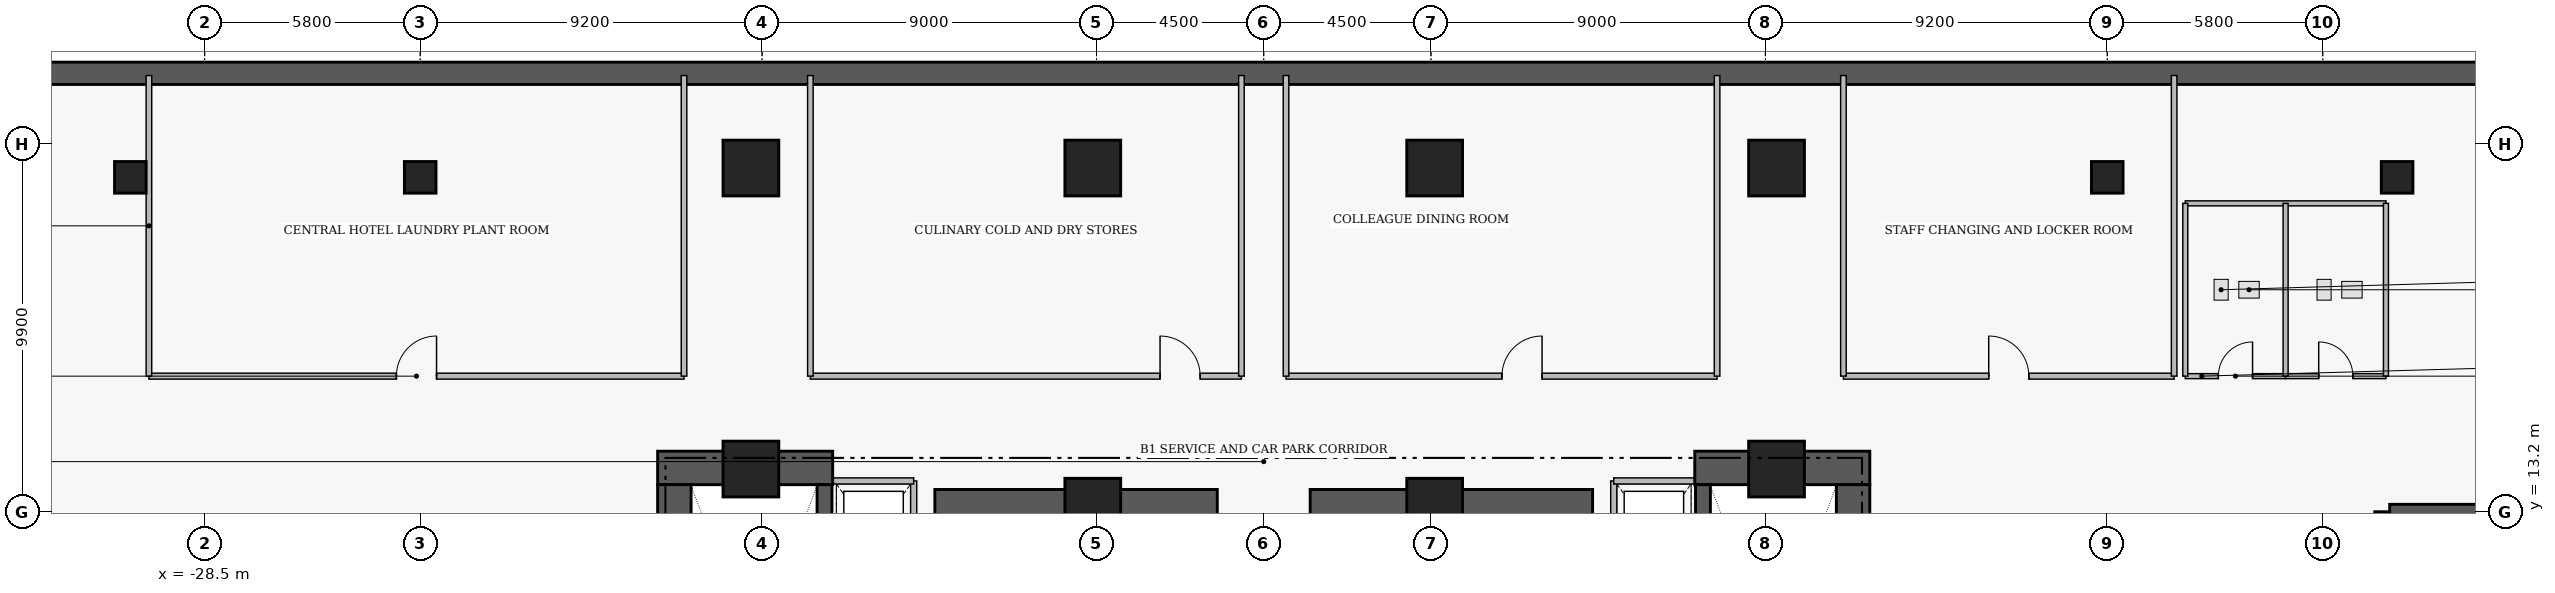
"""IFC4 building model, lengths in metres.
Left out: names, types, materials, properties, quantities, classifications, styles, units other than length and angle.
Written with IfcOpenShell. Run it as: python <this file> out.ifc"""

import sys

from ifc_helpers import new_model, si_unit, direction, frame, frame_2d, origin, origin_2d, place, context, subcontext, project, spatial, rectangle, extrude, element, fill, save


model = new_model("IFC4")
c1 = context("Model", 3, precision=1e-05, world=origin(), true_north=direction((0.0, 1.0)))
c2 = subcontext(c1, "Body", "Model", "MODEL_VIEW")
j1 = project(units=[si_unit("LENGTHUNIT", "METRE"), si_unit("PLANEANGLEUNIT", "RADIAN")], contexts=[c1])
p1 = place(None, origin())
s1 = spatial("IfcSite", under=j1, at=p1, CompositionType="ELEMENT")
p2 = place(p1, origin())
s2 = spatial("IfcBuilding", under=s1, at=p2, CompositionType="ELEMENT")
p3 = place(p2, frame((0.0, 0.0, -4.5)))
s3 = spatial("IfcBuildingStorey", under=s2, at=p3, CompositionType="ELEMENT", Elevation=-4.5)
p4 = place(p3, frame((-36.3, 25.0, 0.0), z_axis=(0.0, 0.0, 1.0), x_axis=(1.0, 0.0, 0.0)))
e1 = element("IfcWall", 1, at=p4, inside=s3, PredefinedType="USERDEFINED", context=c2, shape_type="SweptSolid", body=[
    extrude(rectangle(XDim=72.6, YDim=0.6, at=frame_2d((36.3, 0.0))), origin(), (0.0, 0.0, 1.0), 4.24),
])
for number, where, z_axis, x_axis in (
    (2, (-16.31, 14.38, 0.0), (0.0, 0.0, 1.0), (1.0, 0.0, 0.0)),
    (3, (11.6, 14.38, 0.0), (0.0, 0.0, 1.0), (1.0, 0.0, 0.0)),
):
    element("IfcWall", number, at=place(p3, frame(where, z_axis=z_axis, x_axis=x_axis)), inside=s3, PredefinedType="SHEAR", context=c2, shape_type="SweptSolid", body=[
        extrude(rectangle(XDim=4.71, YDim=0.9, at=frame_2d((2.355, 0.0))), origin(), (0.0, 0.0, 1.0), 4.31),
    ])
for number, where, z_axis, x_axis in (
    (4, (-15.86, 4.97, 0.0), (0.0, 0.0, 1.0), (0.0, 1.0, 0.0)),
    (5, (15.86, 4.97, 0.0), (0.0, 0.0, 1.0), (0.0, 1.0, 0.0)),
):
    element("IfcWall", number, at=place(p3, frame(where, z_axis=z_axis, x_axis=x_axis)), inside=s3, PredefinedType="SHEAR", context=c2, shape_type="SweptSolid", body=[
        extrude(rectangle(XDim=8.96, YDim=0.9, at=frame_2d((4.48, 0.0))), origin(), (0.0, 0.0, 1.0), 4.31),
    ])
for number, where, z_axis, x_axis in (
    (6, (-8.85, 13.35, 0.0), (0.0, 0.0, 1.0), (1.0, 0.0, 0.0)),
    (7, (1.25, 13.35, 0.0), (0.0, 0.0, 1.0), (1.0, 0.0, 0.0)),
):
    element("IfcWall", number, at=place(p3, frame(where, z_axis=z_axis, x_axis=x_axis)), inside=s3, PredefinedType="SHEAR", context=c2, shape_type="SweptSolid", body=[
        extrude(rectangle(XDim=7.6, YDim=0.9, at=frame_2d((3.8, 0.0))), origin(), (0.0, 0.0, 1.0), 4.24),
    ])
p5 = place(p3, frame((-11.82, 4.97, 0.0), z_axis=(0.0, 0.0, 1.0), x_axis=(0.0, 1.0, 0.0)))
e8 = element("IfcWall", 8, at=p5, inside=s3, PredefinedType="SHEAR", context=c2, shape_type="SweptSolid", body=[
    extrude(rectangle(XDim=8.96, YDim=0.4, at=frame_2d((4.48, 0.0))), origin(), (0.0, 0.0, 1.0), 4.31),
])
p6 = place(p5, frame((0.31, 0.0, 0.0)))
e9 = element("IfcOpeningElement", 9, at=p6, cuts=e8, PredefinedType="OPENING", context=c2, shape_type="SweptSolid", body=[
    extrude(rectangle(XDim=1.12, YDim=2.22, at=frame_2d((0.56, 1.11))), frame((0.0, 0.21, 0.0), z_axis=(0.0, -1.0, 0.0), x_axis=(1.0, 0.0, 0.0)), (0.0, 0.0, 1.0), 0.42),
])
p7 = place(p3, frame((11.82, 13.93, 0.0), z_axis=(0.0, 0.0, 1.0), x_axis=(0.0, -1.0, 0.0)))
e10 = element("IfcWall", 10, at=p7, inside=s3, PredefinedType="SHEAR", context=c2, shape_type="SweptSolid", body=[
    extrude(rectangle(XDim=8.96, YDim=0.4, at=frame_2d((4.48, 0.0))), origin(), (0.0, 0.0, 1.0), 4.31),
])
p8 = place(p7, frame((7.53, 0.0, 0.0)))
e11 = element("IfcOpeningElement", 11, at=p8, cuts=e10, PredefinedType="OPENING", context=c2, shape_type="SweptSolid", body=[
    extrude(rectangle(XDim=1.12, YDim=2.22, at=frame_2d((0.56, 1.11))), frame((0.0, 0.21, 0.0), z_axis=(0.0, -1.0, 0.0), x_axis=(1.0, 0.0, 0.0)), (0.0, 0.0, 1.0), 0.42),
])
p9 = place(p3, frame((30.1, 13.2, 0.0), z_axis=(0.0, 0.0, 1.0), x_axis=(0.0, -1.0, 0.0)))
e12 = element("IfcWall", 12, at=p9, inside=s3, PredefinedType="SHEAR", context=c2, shape_type="SweptSolid", body=[
    extrude(rectangle(XDim=11.8, YDim=0.4, at=frame_2d((5.9, 0.0))), origin(), (0.0, 0.0, 1.0), 4.31),
])
p10 = place(p9, frame((9.7, 0.0, 0.0)))
e13 = element("IfcOpeningElement", 13, at=p10, cuts=e12, PredefinedType="OPENING", context=c2, shape_type="SweptSolid", body=[
    extrude(rectangle(XDim=1.12, YDim=2.22, at=frame_2d((0.56, 1.11))), frame((0.0, 0.21, 0.0), z_axis=(0.0, -1.0, 0.0), x_axis=(1.0, 0.0, 0.0)), (0.0, 0.0, 1.0), 0.42),
])
p11 = place(p3, frame((30.3, 13.2, 0.0), z_axis=(0.0, 0.0, 1.0), x_axis=(1.0, 0.0, 0.0)))
e14 = element("IfcWall", 14, at=p11, inside=s3, PredefinedType="SHEAR", context=c2, shape_type="SweptSolid", body=[
    extrude(rectangle(XDim=5.4, YDim=0.4, at=frame_2d((2.7, 0.0))), origin(), (0.0, 0.0, 1.0), 4.31),
])
for number, where, z_axis, x_axis in (
    (15, (-13.8, 14.35, 0.0), (0.0, 0.0, 1.0), (1.0, 0.0, 0.0)),
    (16, (-4.6, 13.35, 0.0), (0.0, 0.0, 1.0), (1.0, 0.0, 0.0)),
    (17, (4.6, 13.35, 0.0), (0.0, 0.0, 1.0), (1.0, 0.0, 0.0)),
    (18, (13.8, 14.35, 0.0), (0.0, 0.0, 1.0), (1.0, 0.0, 0.0)),
    (19, (-13.8, 22.45, 0.0), (0.0, 0.0, 1.0), (1.0, 0.0, 0.0)),
    (20, (-4.6, 22.45, 0.0), (0.0, 0.0, 1.0), (1.0, 0.0, 0.0)),
    (21, (4.6, 22.45, 0.0), (0.0, 0.0, 1.0), (1.0, 0.0, 0.0)),
    (22, (13.8, 22.45, 0.0), (0.0, 0.0, 1.0), (1.0, 0.0, 0.0)),
):
    element("IfcColumn", number, at=place(p3, frame(where, z_axis=z_axis, x_axis=x_axis)), inside=s3, PredefinedType="COLUMN", context=c2, shape_type="SweptSolid", body=[
        extrude(rectangle(XDim=1.5, YDim=1.5, at=origin_2d()), origin(), (0.0, 0.0, 1.0), 4.5),
    ])
for number, where, z_axis, x_axis in (
    (23, (-30.5, 22.2, 0.0), (0.0, 0.0, 1.0), (1.0, 0.0, 0.0)),
    (24, (30.5, 22.2, 0.0), (0.0, 0.0, 1.0), (1.0, 0.0, 0.0)),
    (25, (-22.7, 22.2, 0.0), (0.0, 0.0, 1.0), (1.0, 0.0, 0.0)),
    (26, (22.7, 22.2, 0.0), (0.0, 0.0, 1.0), (1.0, 0.0, 0.0)),
):
    element("IfcColumn", number, at=place(p3, frame(where, z_axis=z_axis, x_axis=x_axis)), inside=s3, PredefinedType="COLUMN", context=c2, shape_type="SweptSolid", body=[
        extrude(rectangle(XDim=0.85, YDim=0.85, at=origin_2d()), origin(), (0.0, 0.0, 1.0), 4.5),
    ])
p12 = place(p3, frame((-30.0, 16.85, 0.0), z_axis=(0.0, 0.0, 1.0), x_axis=(1.0, 0.0, 0.0)))
e27 = element("IfcWall", 27, at=p12, inside=s3, PredefinedType="PARTITIONING", context=c2, shape_type="SweptSolid", body=[
    extrude(rectangle(XDim=14.4, YDim=0.16, at=frame_2d((7.2, 0.0))), origin(), (0.0, 0.0, 1.0), 4.24),
])
p13 = place(p12, frame((6.66, 0.0, 0.0)))
e28 = element("IfcOpeningElement", 28, at=p13, cuts=e27, PredefinedType="OPENING", context=c2, shape_type="SweptSolid", body=[
    extrude(rectangle(XDim=1.08, YDim=2.18, at=frame_2d((0.54, 1.09))), frame((0.0, 0.09, 0.0), z_axis=(0.0, -1.0, 0.0), x_axis=(1.0, 0.0, 0.0)), (0.0, 0.0, 1.0), 0.18),
])
p14 = place(p3, frame((-12.2, 16.85, 0.0), z_axis=(0.0, 0.0, 1.0), x_axis=(1.0, 0.0, 0.0)))
e29 = element("IfcWall", 29, at=p14, inside=s3, PredefinedType="PARTITIONING", context=c2, shape_type="SweptSolid", body=[
    extrude(rectangle(XDim=11.6, YDim=0.16, at=frame_2d((5.8, 0.0))), origin(), (0.0, 0.0, 1.0), 3.707),
])
p15 = place(p14, frame((9.41, 0.0, 0.0)))
e30 = element("IfcOpeningElement", 30, at=p15, cuts=e29, PredefinedType="OPENING", context=c2, shape_type="SweptSolid", body=[
    extrude(rectangle(XDim=1.08, YDim=2.18, at=frame_2d((0.54, 1.09))), frame((0.0, 0.09, 0.0), z_axis=(0.0, -1.0, 0.0), x_axis=(1.0, 0.0, 0.0)), (0.0, 0.0, 1.0), 0.18),
])
p16 = place(p3, frame((0.6, 16.85, 0.0), z_axis=(0.0, 0.0, 1.0), x_axis=(1.0, 0.0, 0.0)))
e31 = element("IfcWall", 31, at=p16, inside=s3, PredefinedType="PARTITIONING", context=c2, shape_type="SweptSolid", body=[
    extrude(rectangle(XDim=11.6, YDim=0.16, at=frame_2d((5.8, 0.0))), origin(), (0.0, 0.0, 1.0), 3.707),
])
p17 = place(p16, frame((5.81, 0.0, 0.0)))
e32 = element("IfcOpeningElement", 32, at=p17, cuts=e31, PredefinedType="OPENING", context=c2, shape_type="SweptSolid", body=[
    extrude(rectangle(XDim=1.08, YDim=2.18, at=frame_2d((0.54, 1.09))), frame((0.0, 0.09, 0.0), z_axis=(0.0, -1.0, 0.0), x_axis=(1.0, 0.0, 0.0)), (0.0, 0.0, 1.0), 0.18),
])
p18 = place(p3, frame((15.6, 16.85, 0.0), z_axis=(0.0, 0.0, 1.0), x_axis=(1.0, 0.0, 0.0)))
e33 = element("IfcWall", 33, at=p18, inside=s3, PredefinedType="PARTITIONING", context=c2, shape_type="SweptSolid", body=[
    extrude(rectangle(XDim=8.9, YDim=0.16, at=frame_2d((4.45, 0.0))), origin(), (0.0, 0.0, 1.0), 4.24),
])
p19 = place(p18, frame((3.91, 0.0, 0.0)))
e34 = element("IfcOpeningElement", 34, at=p19, cuts=e33, PredefinedType="OPENING", context=c2, shape_type="SweptSolid", body=[
    extrude(rectangle(XDim=1.08, YDim=2.18, at=frame_2d((0.54, 1.09))), frame((0.0, 0.09, 0.0), z_axis=(0.0, -1.0, 0.0), x_axis=(1.0, 0.0, 0.0)), (0.0, 0.0, 1.0), 0.18),
])
p20 = place(p3, frame((24.8, 16.85, 0.0), z_axis=(0.0, 0.0, 1.0), x_axis=(1.0, 0.0, 0.0)))
e35 = element("IfcWall", 35, at=p20, inside=s3, PredefinedType="PLUMBINGWALL", context=c2, shape_type="SweptSolid", body=[
    extrude(rectangle(XDim=2.7, YDim=0.135, at=frame_2d((1.35, 0.0))), origin(), (0.0, 0.0, 1.0), 4.24),
])
p21 = place(p20, frame((0.89, 0.0, 0.0)))
e36 = element("IfcOpeningElement", 36, at=p21, cuts=e35, PredefinedType="OPENING", context=c2, shape_type="SweptSolid", body=[
    extrude(rectangle(XDim=0.92, YDim=2.12, at=frame_2d((0.46, 1.06))), frame((0.0, 0.077, 0.0), z_axis=(0.0, -1.0, 0.0), x_axis=(1.0, 0.0, 0.0)), (0.0, 0.0, 1.0), 0.155),
])
p22 = place(p3, frame((27.5, 16.85, 0.0), z_axis=(0.0, 0.0, 1.0), x_axis=(1.0, 0.0, 0.0)))
e37 = element("IfcWall", 37, at=p22, inside=s3, PredefinedType="PLUMBINGWALL", context=c2, shape_type="SweptSolid", body=[
    extrude(rectangle(XDim=2.7, YDim=0.135, at=frame_2d((1.35, 0.0))), origin(), (0.0, 0.0, 1.0), 4.24),
])
p23 = place(p22, frame((0.89, 0.0, 0.0)))
e38 = element("IfcOpeningElement", 38, at=p23, cuts=e37, PredefinedType="OPENING", context=c2, shape_type="SweptSolid", body=[
    extrude(rectangle(XDim=0.92, YDim=2.12, at=frame_2d((0.46, 1.06))), frame((0.0, 0.077, 0.0), z_axis=(0.0, -1.0, 0.0), x_axis=(1.0, 0.0, 0.0)), (0.0, 0.0, 1.0), 0.155),
])
p24 = place(p3, frame((-9.42, 11.07, 0.0), z_axis=(0.0, 0.0, 1.0), x_axis=(0.0, 1.0, 0.0)))
e39 = element("IfcWall", 39, at=p24, inside=s3, PredefinedType="PARTITIONING", context=c2, shape_type="SweptSolid", body=[
    extrude(rectangle(XDim=2.96, YDim=0.165, at=frame_2d((1.48, 0.0))), origin(), (0.0, 0.0, 1.0), 4.24),
])
p25 = place(p3, frame((-11.58, 14.03, 0.0), z_axis=(0.0, 0.0, 1.0), x_axis=(1.0, 0.0, 0.0)))
e40 = element("IfcWall", 40, at=p25, inside=s3, PredefinedType="PARTITIONING", context=c2, shape_type="SweptSolid", body=[
    extrude(rectangle(XDim=2.16, YDim=0.165, at=frame_2d((1.08, 0.0))), origin(), (0.0, 0.0, 1.0), 4.24),
])
p26 = place(p3, frame((9.42, 11.07, 0.0), z_axis=(0.0, 0.0, 1.0), x_axis=(0.0, 1.0, 0.0)))
e41 = element("IfcWall", 41, at=p26, inside=s3, PredefinedType="PARTITIONING", context=c2, shape_type="SweptSolid", body=[
    extrude(rectangle(XDim=2.96, YDim=0.165, at=frame_2d((1.48, 0.0))), origin(), (0.0, 0.0, 1.0), 4.24),
])
p27 = place(p3, frame((9.42, 14.03, 0.0), z_axis=(0.0, 0.0, 1.0), x_axis=(1.0, 0.0, 0.0)))
e42 = element("IfcWall", 42, at=p27, inside=s3, PredefinedType="PARTITIONING", context=c2, shape_type="SweptSolid", body=[
    extrude(rectangle(XDim=2.16, YDim=0.165, at=frame_2d((1.08, 0.0))), origin(), (0.0, 0.0, 1.0), 4.24),
])
for number, where, z_axis, x_axis in (
    (43, (-30.0, 16.85, 0.0), (0.0, 0.0, 1.0), (0.0, 1.0, 0.0)),
    (44, (-15.6, 16.85, 0.0), (0.0, 0.0, 1.0), (0.0, 1.0, 0.0)),
    (45, (-12.2, 16.85, 0.0), (0.0, 0.0, 1.0), (0.0, 1.0, 0.0)),
    (46, (-0.6, 16.85, 0.0), (0.0, 0.0, 1.0), (0.0, 1.0, 0.0)),
    (47, (0.6, 16.85, 0.0), (0.0, 0.0, 1.0), (0.0, 1.0, 0.0)),
    (48, (12.2, 16.85, 0.0), (0.0, 0.0, 1.0), (0.0, 1.0, 0.0)),
    (49, (15.6, 16.85, 0.0), (0.0, 0.0, 1.0), (0.0, 1.0, 0.0)),
    (50, (24.5, 16.85, 0.0), (0.0, 0.0, 1.0), (0.0, 1.0, 0.0)),
):
    element("IfcWall", number, at=place(p3, frame(where, z_axis=z_axis, x_axis=x_axis)), inside=s3, PredefinedType="PARTITIONING", context=c2, shape_type="SweptSolid", body=[
        extrude(rectangle(XDim=8.09, YDim=0.15, at=frame_2d((4.045, 0.0))), origin(), (0.0, 0.0, 1.0), 4.24),
    ])
p28 = place(p3, frame((24.8, 21.5, 0.0), z_axis=(0.0, 0.0, 1.0), x_axis=(1.0, 0.0, 0.0)))
e51 = element("IfcWall", 51, at=p28, inside=s3, PredefinedType="PLUMBINGWALL", context=c2, shape_type="SweptSolid", body=[
    extrude(rectangle(XDim=5.4, YDim=0.135, at=frame_2d((2.7, 0.0))), origin(), (0.0, 0.0, 1.0), 4.24),
])
for number, where, z_axis, x_axis in (
    (52, (24.8, 16.85, 0.0), (0.0, 0.0, 1.0), (0.0, 1.0, 0.0)),
    (53, (30.2, 16.85, 0.0), (0.0, 0.0, 1.0), (0.0, 1.0, 0.0)),
    (54, (27.5, 16.85, 0.0), (0.0, 0.0, 1.0), (0.0, 1.0, 0.0)),
):
    element("IfcWall", number, at=place(p3, frame(where, z_axis=z_axis, x_axis=x_axis)), inside=s3, PredefinedType="PLUMBINGWALL", context=c2, shape_type="SweptSolid", body=[
        extrude(rectangle(XDim=4.65, YDim=0.135, at=frame_2d((2.325, 0.0))), origin(), (0.0, 0.0, 1.0), 4.24),
    ])
p29 = place(p13, origin())
e55 = element("IfcDoor", 55, at=p29, inside=s3, OperationType="SINGLE_SWING_RIGHT", PredefinedType="DOOR", context=c2, shape_type="SweptSolid", body=[
    extrude(rectangle(XDim=1.08, YDim=2.18, at=frame_2d((0.54, 1.09))), frame((0.0, 0.025, 0.0), z_axis=(0.0, -1.0, 0.0), x_axis=(1.0, 0.0, 0.0)), (0.0, 0.0, 1.0), 0.05),
])
fill(e28, e55)
p30 = place(p15, origin())
e56 = element("IfcDoor", 56, at=p30, inside=s3, OperationType="SINGLE_SWING_LEFT", PredefinedType="DOOR", context=c2, shape_type="SweptSolid", body=[
    extrude(rectangle(XDim=1.08, YDim=2.18, at=frame_2d((0.54, 1.09))), frame((0.0, 0.025, 0.0), z_axis=(0.0, -1.0, 0.0), x_axis=(1.0, 0.0, 0.0)), (0.0, 0.0, 1.0), 0.05),
])
fill(e30, e56)
p31 = place(p17, origin())
e57 = element("IfcDoor", 57, at=p31, inside=s3, OperationType="SINGLE_SWING_RIGHT", PredefinedType="DOOR", context=c2, shape_type="SweptSolid", body=[
    extrude(rectangle(XDim=1.08, YDim=2.18, at=frame_2d((0.54, 1.09))), frame((0.0, 0.025, 0.0), z_axis=(0.0, -1.0, 0.0), x_axis=(1.0, 0.0, 0.0)), (0.0, 0.0, 1.0), 0.05),
])
fill(e32, e57)
p32 = place(p19, origin())
e58 = element("IfcDoor", 58, at=p32, inside=s3, OperationType="SINGLE_SWING_LEFT", PredefinedType="DOOR", context=c2, shape_type="SweptSolid", body=[
    extrude(rectangle(XDim=1.08, YDim=2.18, at=frame_2d((0.54, 1.09))), frame((0.0, 0.025, 0.0), z_axis=(0.0, -1.0, 0.0), x_axis=(1.0, 0.0, 0.0)), (0.0, 0.0, 1.0), 0.05),
])
fill(e34, e58)
p33 = place(p21, origin())
e59 = element("IfcDoor", 59, at=p33, inside=s3, OperationType="SINGLE_SWING_RIGHT", PredefinedType="DOOR", context=c2, shape_type="SweptSolid", body=[
    extrude(rectangle(XDim=0.92, YDim=2.12, at=frame_2d((0.46, 1.06))), frame((0.0, 0.025, 0.0), z_axis=(0.0, -1.0, 0.0), x_axis=(1.0, 0.0, 0.0)), (0.0, 0.0, 1.0), 0.05),
])
fill(e36, e59)
p34 = place(p23, origin())
e60 = element("IfcDoor", 60, at=p34, inside=s3, OperationType="SINGLE_SWING_LEFT", PredefinedType="DOOR", context=c2, shape_type="SweptSolid", body=[
    extrude(rectangle(XDim=0.92, YDim=2.12, at=frame_2d((0.46, 1.06))), frame((0.0, 0.025, 0.0), z_axis=(0.0, -1.0, 0.0), x_axis=(1.0, 0.0, 0.0)), (0.0, 0.0, 1.0), 0.05),
])
fill(e38, e60)
save(model, sys.argv[1])
